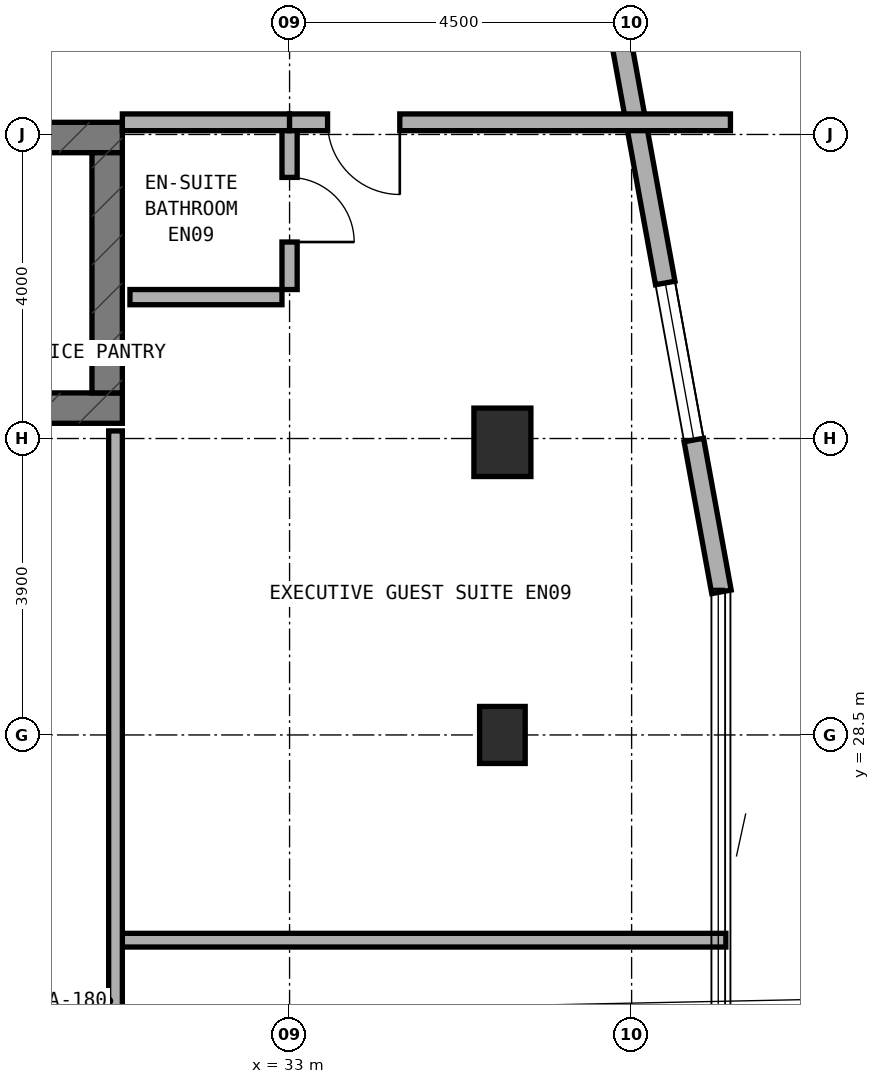
"""IFC4 building model, lengths in metres.
Left out: names, types, materials, properties, quantities, classifications, styles, units other than length and angle.
Written with IfcOpenShell. Run it as: python <this file> out.ifc"""

import sys

from ifc_helpers import new_model, si_unit, direction, frame, frame_2d, origin, origin_2d, place, context, subcontext, project, spatial, rectangle, extrude, element, fill, save


model = new_model("IFC4")
c1 = context("Model", 3, precision=1e-05, world=origin(), true_north=direction((0.0, 1.0)))
c2 = subcontext(c1, "Body", "Model", "MODEL_VIEW")
j1 = project(units=[si_unit("LENGTHUNIT", "METRE"), si_unit("PLANEANGLEUNIT", "RADIAN")], contexts=[c1])
p1 = place(None, origin())
s1 = spatial("IfcSite", under=j1, at=p1, CompositionType="ELEMENT")
p2 = place(p1, origin())
s2 = spatial("IfcBuilding", under=s1, at=p2, CompositionType="ELEMENT")
p3 = place(p2, frame((0.0, 0.0, 254.0)))
s3 = spatial("IfcBuildingStorey", under=s2, at=p3, CompositionType="ELEMENT", Elevation=254.0)
p4 = place(p3, frame((6.4, 32.8, 0.0), z_axis=(0.0, 0.0, 1.0), x_axis=(1.0, 0.0, 0.0)))
e1 = element("IfcWall", 1, at=p4, inside=s3, PredefinedType="SHEAR", context=c2, shape_type="SweptSolid", body=[
    extrude(rectangle(XDim=24.4, YDim=0.4, at=frame_2d((12.2, 0.0))), origin(), (0.0, 0.0, 1.0), 3.6),
])
p5 = place(p4, frame((6.05, 0.0, 0.0)))
e2 = element("IfcOpeningElement", 2, at=p5, cuts=e1, PredefinedType="OPENING", context=c2, shape_type="SweptSolid", body=[
    extrude(rectangle(XDim=1.1, YDim=2.15, at=frame_2d((0.55, 1.075))), frame((0.0, 0.21, 0.0), z_axis=(0.0, -1.0, 0.0), x_axis=(1.0, 0.0, 0.0)), (0.0, 0.0, 1.0), 0.42),
])
p6 = place(p3, frame((6.4, 36.36, 0.0), z_axis=(0.0, 0.0, 1.0), x_axis=(1.0, 0.0, 0.0)))
e3 = element("IfcWall", 3, at=p6, inside=s3, PredefinedType="SHEAR", context=c2, shape_type="SweptSolid", body=[
    extrude(rectangle(XDim=24.4, YDim=0.4, at=frame_2d((12.2, 0.0))), origin(), (0.0, 0.0, 1.0), 3.6),
])
p7 = place(p6, frame((9.15, 0.0, 0.0)))
e4 = element("IfcOpeningElement", 4, at=p7, cuts=e3, PredefinedType="OPENING", context=c2, shape_type="SweptSolid", body=[
    extrude(rectangle(XDim=1.2, YDim=2.15, at=frame_2d((0.6, 1.075))), frame((0.0, 0.21, 0.0), z_axis=(0.0, -1.0, 0.0), x_axis=(1.0, 0.0, 0.0)), (0.0, 0.0, 1.0), 0.42),
])
p8 = place(p6, frame((19.2, 0.0, 0.0)))
e5 = element("IfcOpeningElement", 5, at=p8, cuts=e3, PredefinedType="OPENING", context=c2, shape_type="SweptSolid", body=[
    extrude(rectangle(XDim=0.85, YDim=2.1, at=frame_2d((0.425, 1.05))), frame((0.0, 0.21, 0.0), z_axis=(0.0, -1.0, 0.0), x_axis=(1.0, 0.0, 0.0)), (0.0, 0.0, 1.0), 0.42),
])
p9 = place(p6, frame((16.94, 0.0, 0.0)))
e6 = element("IfcOpeningElement", 6, at=p9, cuts=e3, PredefinedType="OPENING", context=c2, shape_type="SweptSolid", body=[
    extrude(rectangle(XDim=0.85, YDim=2.1, at=frame_2d((0.425, 1.05))), frame((0.0, 0.21, 0.0), z_axis=(0.0, -1.0, 0.0), x_axis=(1.0, 0.0, 0.0)), (0.0, 0.0, 1.0), 0.42),
])
p10 = place(p3, frame((30.6, 33.0, 0.0), z_axis=(0.0, 0.0, 1.0), x_axis=(0.0, 1.0, 0.0)))
e7 = element("IfcWall", 7, at=p10, inside=s3, PredefinedType="SHEAR", context=c2, shape_type="SweptSolid", body=[
    extrude(rectangle(XDim=3.16, YDim=0.4, at=frame_2d((1.58, 0.0))), origin(), (0.0, 0.0, 1.0), 3.6),
])
p11 = place(p3, frame((35.8, 28.5, 0.0), z_axis=(0.0, 0.0, 1.0), x_axis=(1.0, 0.0, 0.0)))
e8 = element("IfcColumn", 8, at=p11, inside=s3, PredefinedType="COLUMN", context=c2, shape_type="SweptSolid", body=[
    extrude(rectangle(XDim=0.6, YDim=0.75, at=origin_2d()), origin(), (0.0, 0.0, 1.0), 3.6),
])
p12 = place(p3, frame((35.8, 32.35, 0.0), z_axis=(0.0, 0.0, 1.0), x_axis=(1.0, 0.0, 0.0)))
e9 = element("IfcColumn", 9, at=p12, inside=s3, PredefinedType="COLUMN", context=c2, shape_type="SweptSolid", body=[
    extrude(rectangle(XDim=0.75, YDim=0.9, at=origin_2d()), origin(), (0.0, 0.0, 1.0), 3.6),
])
p13 = place(p3, frame((38.682, 30.383, 0.0), z_axis=(0.0, 0.0, 1.0), x_axis=(-0.179061111398, 0.983837953316, 0.0)))
e10 = element("IfcWall", 10, at=p13, inside=s3, PredefinedType="STANDARD", context=c2, shape_type="SweptSolid", body=[
    extrude(rectangle(XDim=8.438, YDim=0.26, at=frame_2d((4.219, 0.0))), origin(), (0.0, 0.0, 1.0), 3.32),
])
p14 = place(p13, frame((2.03, 0.0, 0.85)))
e11 = element("IfcOpeningElement", 11, at=p14, cuts=e10, PredefinedType="OPENING", context=c2, shape_type="SweptSolid", body=[
    extrude(rectangle(XDim=2.1, YDim=1.5, at=frame_2d((1.05, 0.75))), frame((0.0, 0.14, 0.0), z_axis=(0.0, -1.0, 0.0), x_axis=(1.0, 0.0, 0.0)), (0.0, 0.0, 1.0), 0.28),
])
p15 = place(p3, frame((30.8, 25.8, 0.0), z_axis=(0.0, 0.0, 1.0), x_axis=(1.0, 0.0, 0.0)))
e12 = element("IfcWall", 12, at=p15, inside=s3, PredefinedType="SOLIDWALL", context=c2, shape_type="SweptSolid", body=[
    extrude(rectangle(XDim=7.94, YDim=0.18, at=frame_2d((3.97, 0.0))), origin(), (0.0, 0.0, 1.0), 3.015),
])
p16 = place(p3, frame((30.71, 17.5, 0.0), z_axis=(0.0, 0.0, 1.0), x_axis=(0.0, 1.0, 0.0)))
e13 = element("IfcWall", 13, at=p16, inside=s3, PredefinedType="SOLIDWALL", context=c2, shape_type="SweptSolid", body=[
    extrude(rectangle(XDim=15.0, YDim=0.18, at=frame_2d((7.5, 0.0))), origin(), (0.0, 0.0, 1.0), 2.745),
])
p17 = place(p3, frame((33.0, 34.36, 0.0), z_axis=(0.0, 0.0, 1.0), x_axis=(0.0, 1.0, 0.0)))
e14 = element("IfcWall", 14, at=p17, inside=s3, PredefinedType="PLUMBINGWALL", context=c2, shape_type="SweptSolid", body=[
    extrude(rectangle(XDim=2.1, YDim=0.2, at=frame_2d((1.05, 0.0))), origin(), (0.0, 0.0, 1.0), 3.32),
])
p18 = place(p17, frame((0.625, 0.0, 0.0)))
e15 = element("IfcOpeningElement", 15, at=p18, cuts=e14, PredefinedType="OPENING", context=c2, shape_type="SweptSolid", body=[
    extrude(rectangle(XDim=0.85, YDim=2.1, at=frame_2d((0.425, 1.05))), frame((0.0, 0.11, 0.0), z_axis=(0.0, -1.0, 0.0), x_axis=(1.0, 0.0, 0.0)), (0.0, 0.0, 1.0), 0.22),
])
p19 = place(p3, frame((30.9, 34.26, 0.0), z_axis=(0.0, 0.0, 1.0), x_axis=(1.0, 0.0, 0.0)))
e16 = element("IfcWall", 16, at=p19, inside=s3, PredefinedType="PLUMBINGWALL", context=c2, shape_type="SweptSolid", body=[
    extrude(rectangle(XDim=2.0, YDim=0.2, at=frame_2d((1.0, 0.0))), origin(), (0.0, 0.0, 1.0), 3.32),
])
p20 = place(p3, frame((30.8, 36.56, 0.0), z_axis=(0.0, 0.0, 1.0), x_axis=(1.0, 0.0, 0.0)))
e17 = element("IfcWall", 17, at=p20, inside=s3, PredefinedType="SOLIDWALL", context=c2, shape_type="SweptSolid", body=[
    extrude(rectangle(XDim=2.2, YDim=0.22, at=frame_2d((1.1, 0.0))), origin(), (0.0, 0.0, 1.0), 3.32),
])
p21 = place(p3, frame((33.0, 36.56, 0.0), z_axis=(0.0, 0.0, 1.0), x_axis=(1.0, 0.0, 0.0)))
e18 = element("IfcWall", 18, at=p21, inside=s3, PredefinedType="SOLIDWALL", context=c2, shape_type="SweptSolid", body=[
    extrude(rectangle(XDim=5.8, YDim=0.22, at=frame_2d((2.9, 0.0))), origin(), (0.0, 0.0, 1.0), 2.745),
])
p22 = place(p21, frame((0.5, 0.0, 0.0)))
e19 = element("IfcOpeningElement", 19, at=p22, cuts=e18, PredefinedType="OPENING", context=c2, shape_type="SweptSolid", body=[
    extrude(rectangle(XDim=0.95, YDim=2.1, at=frame_2d((0.475, 1.05))), frame((0.0, 0.12, 0.0), z_axis=(0.0, -1.0, 0.0), x_axis=(1.0, 0.0, 0.0)), (0.0, 0.0, 1.0), 0.24),
])
p23 = place(p14, origin())
e20 = element("IfcWindow", 20, at=p23, inside=s3, PartitioningType="SINGLE_PANEL", PredefinedType="WINDOW", context=c2, shape_type="SweptSolid", body=[
    extrude(rectangle(XDim=2.1, YDim=1.5, at=frame_2d((1.05, 0.75))), frame((0.0, 0.03, 0.0), z_axis=(0.0, -1.0, 0.0), x_axis=(1.0, 0.0, 0.0)), (0.0, 0.0, 1.0), 0.06),
])
fill(e11, e20)
p24 = place(p18, frame((0.85, 0.0, 0.0), z_axis=(0.0, 0.0, 1.0), x_axis=(-1.0, 0.0, 0.0)))
e21 = element("IfcDoor", 21, at=p24, inside=s3, OperationType="SINGLE_SWING_RIGHT", PredefinedType="DOOR", context=c2, shape_type="SweptSolid", body=[
    extrude(rectangle(XDim=0.85, YDim=2.1, at=frame_2d((0.425, 1.05))), frame((0.0, 0.025, 0.0), z_axis=(0.0, -1.0, 0.0), x_axis=(1.0, 0.0, 0.0)), (0.0, 0.0, 1.0), 0.05),
])
fill(e15, e21)
p25 = place(p22, frame((0.95, 0.0, 0.0), z_axis=(0.0, 0.0, 1.0), x_axis=(-1.0, 0.0, 0.0)))
e22 = element("IfcDoor", 22, at=p25, inside=s3, OperationType="SINGLE_SWING_LEFT", PredefinedType="DOOR", context=c2, shape_type="SweptSolid", body=[
    extrude(rectangle(XDim=0.95, YDim=2.1, at=frame_2d((0.475, 1.05))), frame((0.0, 0.025, 0.0), z_axis=(0.0, -1.0, 0.0), x_axis=(1.0, 0.0, 0.0)), (0.0, 0.0, 1.0), 0.05),
])
fill(e19, e22)
save(model, sys.argv[1])
